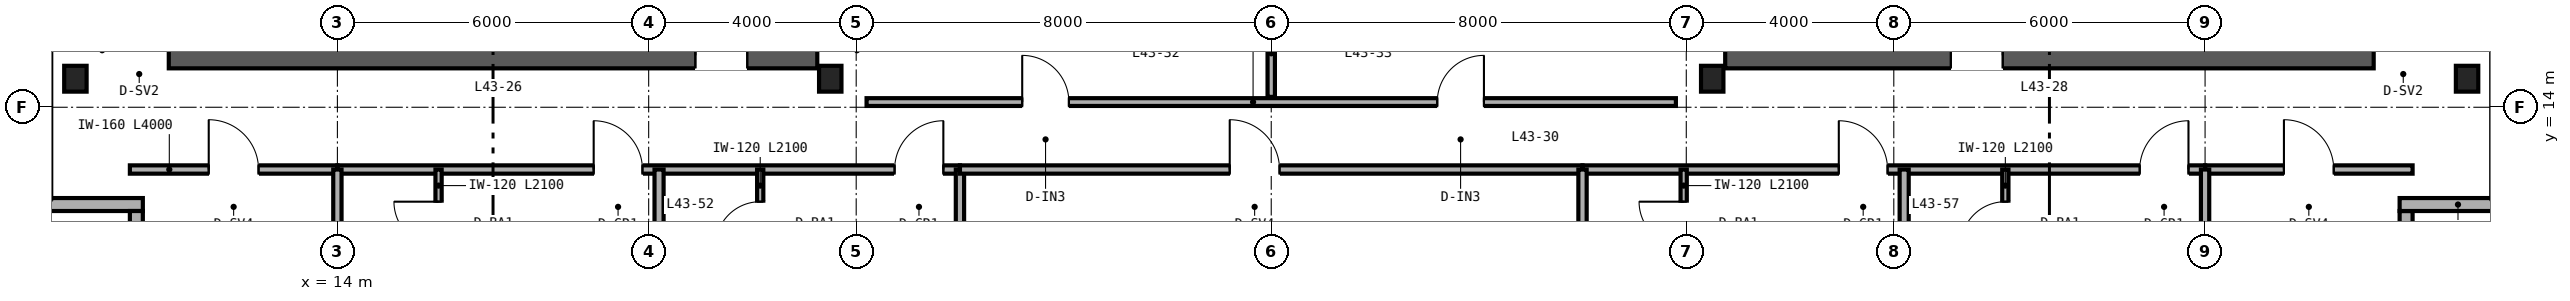
"""IFC4 building model, lengths in metres.
Left out: names, types, materials, properties, quantities, classifications, styles, units other than length and angle.
Written with IfcOpenShell. Run it as: python <this file> out.ifc"""

import sys

from ifc_helpers import new_model, si_unit, direction, frame, frame_2d, origin, origin_2d, place, context, subcontext, project, spatial, rectangle, i_section, extrude, source, transform, mapped, element, fill, save


model = new_model("IFC4")
c1 = context("Model", 3, precision=1e-05, world=origin(), true_north=direction((0.0, 1.0)))
c2 = subcontext(c1, "Body", "Model", "MODEL_VIEW")
j1 = project(units=[si_unit("LENGTHUNIT", "METRE"), si_unit("PLANEANGLEUNIT", "RADIAN")], contexts=[c1])
p1 = place(None, origin())
s1 = spatial("IfcSite", under=j1, at=p1, CompositionType="ELEMENT")
p2 = place(p1, origin())
s2 = spatial("IfcBuilding", under=s1, at=p2, CompositionType="ELEMENT")
p3 = place(p2, frame((0.0, 0.0, 174.0)))
s3 = spatial("IfcBuildingStorey", under=s2, at=p3, CompositionType="ELEMENT", Elevation=174.0)
p4 = place(p3, frame((10.75, 15.0, 0.0), z_axis=(0.0, 0.0, 1.0), x_axis=(1.0, 0.0, 0.0)))
e1 = element("IfcWall", 1, at=p4, inside=s3, PredefinedType="SHEAR", context=c2, shape_type="SweptSolid", body=[
    extrude(rectangle(XDim=12.5, YDim=0.5, at=frame_2d((6.25, 0.0))), origin(), (0.0, 0.0, 1.0), 3.37),
])
p5 = place(p4, frame((10.15, 0.0, 0.0)))
e2 = element("IfcOpeningElement", 2, at=p5, cuts=e1, PredefinedType="OPENING", context=c2, shape_type="SweptSolid", body=[
    extrude(rectangle(XDim=1.0, YDim=2.15, at=frame_2d((0.5, 1.075))), frame((0.0, 0.26, 0.0), z_axis=(0.0, -1.0, 0.0), x_axis=(1.0, 0.0, 0.0)), (0.0, 0.0, 1.0), 0.52),
])
p6 = place(p3, frame((40.75, 15.0, 0.0), z_axis=(0.0, 0.0, 1.0), x_axis=(1.0, 0.0, 0.0)))
e3 = element("IfcWall", 3, at=p6, inside=s3, PredefinedType="SHEAR", context=c2, shape_type="SweptSolid", body=[
    extrude(rectangle(XDim=12.5, YDim=0.5, at=frame_2d((6.25, 0.0))), origin(), (0.0, 0.0, 1.0), 3.37),
])
p7 = place(p6, frame((4.35, 0.0, 0.0)))
e4 = element("IfcOpeningElement", 4, at=p7, cuts=e3, PredefinedType="OPENING", context=c2, shape_type="SweptSolid", body=[
    extrude(rectangle(XDim=1.0, YDim=2.15, at=frame_2d((0.5, 1.075))), frame((0.0, 0.26, 0.0), z_axis=(0.0, -1.0, 0.0), x_axis=(1.0, 0.0, 0.0)), (0.0, 0.0, 1.0), 0.52),
])
m1 = source(origin(), c2, "Body", "SweptSolid", [
    extrude(i_section(OverallWidth=0.432, OverallDepth=0.498, WebThickness=0.056, FlangeThickness=0.089, FilletRadius=0.025, at=origin_2d()), origin(), (0.0, 0.0, 1.0), 3.37),
])
for number, where, z_axis, x_axis in (
    (5, (8.95, 14.55, 0.0), (0.0, 0.0, 1.0), (1.0, 0.0, 0.0)),
    (6, (23.5, 14.55, 0.0), (0.0, 0.0, 1.0), (1.0, 0.0, 0.0)),
    (7, (40.5, 14.55, 0.0), (0.0, 0.0, 1.0), (1.0, 0.0, 0.0)),
    (8, (55.05, 14.55, 0.0), (0.0, 0.0, 1.0), (1.0, 0.0, 0.0)),
):
    element("IfcColumn", number, at=place(p3, frame(where, z_axis=z_axis, x_axis=x_axis)), inside=s3, PredefinedType="COLUMN", context=c2, shape_type="MappedRepresentation", body=[
        mapped(m1, transform((0.0, 0.0, 0.0), scale=1.0)),
    ])
p8 = place(p3, frame((53.875, 10.0, 0.0), z_axis=(0.0, 0.0, 1.0), x_axis=(0.0, 1.0, 0.0)))
e9 = element("IfcWall", 9, at=p8, inside=s3, PredefinedType="SOLIDWALL", context=c2, shape_type="SweptSolid", body=[
    extrude(rectangle(XDim=2.0, YDim=0.25, at=frame_2d((1.0, 0.0))), origin(), (0.0, 0.0, 1.0), 3.37),
])
for number, where, z_axis, x_axis in (
    (10, (53.75, 12.125, 0.0), (0.0, 0.0, 1.0), (1.0, 0.0, 0.0)),
    (11, (8.0, 12.125, 0.0), (0.0, 0.0, 1.0), (1.0, 0.0, 0.0)),
):
    element("IfcWall", number, at=place(p3, frame(where, z_axis=z_axis, x_axis=x_axis)), inside=s3, PredefinedType="SOLIDWALL", context=c2, shape_type="SweptSolid", body=[
        extrude(rectangle(XDim=2.25, YDim=0.25, at=frame_2d((1.125, 0.0))), origin(), (0.0, 0.0, 1.0), 3.37),
    ])
p9 = place(p3, frame((10.125, 12.0, 0.0), z_axis=(0.0, 0.0, 1.0), x_axis=(0.0, -1.0, 0.0)))
e12 = element("IfcWall", 12, at=p9, inside=s3, PredefinedType="SOLIDWALL", context=c2, shape_type="SweptSolid", body=[
    extrude(rectangle(XDim=2.0, YDim=0.25, at=frame_2d((1.0, 0.0))), origin(), (0.0, 0.0, 1.0), 3.37),
])
p10 = place(p3, frame((24.2, 14.1, 0.0), z_axis=(0.0, 0.0, 1.0), x_axis=(1.0, 0.0, 0.0)))
e13 = element("IfcWall", 13, at=p10, inside=s3, PredefinedType="PARTITIONING", context=c2, shape_type="SweptSolid", body=[
    extrude(rectangle(XDim=15.6, YDim=0.15, at=frame_2d((7.8, 0.0))), origin(), (0.0, 0.0, 1.0), 3.37),
])
p11 = place(p10, frame((3.0, 0.0, 0.0)))
e14 = element("IfcOpeningElement", 14, at=p11, cuts=e13, PredefinedType="OPENING", context=c2, shape_type="SweptSolid", body=[
    extrude(rectangle(XDim=0.9, YDim=2.15, at=frame_2d((0.45, 1.075))), frame((0.0, 0.085, 0.0), z_axis=(0.0, -1.0, 0.0), x_axis=(1.0, 0.0, 0.0)), (0.0, 0.0, 1.0), 0.17),
])
p12 = place(p10, frame((11.0, 0.0, 0.0)))
e15 = element("IfcOpeningElement", 15, at=p12, cuts=e13, PredefinedType="OPENING", context=c2, shape_type="SweptSolid", body=[
    extrude(rectangle(XDim=0.9, YDim=2.15, at=frame_2d((0.45, 1.075))), frame((0.0, 0.085, 0.0), z_axis=(0.0, -1.0, 0.0), x_axis=(1.0, 0.0, 0.0)), (0.0, 0.0, 1.0), 0.17),
])
p13 = place(p3, frame((32.0, 14.2, 0.0), z_axis=(0.0, 0.0, 1.0), x_axis=(0.0, 1.0, 0.0)))
e16 = element("IfcWall", 16, at=p13, inside=s3, PredefinedType="PARTITIONING", context=c2, shape_type="SweptSolid", body=[
    extrude(rectangle(XDim=1.68, YDim=0.142, at=frame_2d((0.84, 0.0))), origin(), (0.0, 0.0, 1.0), 3.37),
])
p14 = place(p3, frame((10.0, 12.8, 0.0), z_axis=(0.0, 0.0, 1.0), x_axis=(1.0, 0.0, 0.0)))
e17 = element("IfcWall", 17, at=p14, inside=s3, PredefinedType="PARTITIONING", context=c2, shape_type="SweptSolid", body=[
    extrude(rectangle(XDim=4.0, YDim=0.16, at=frame_2d((2.0, 0.0))), origin(), (0.0, 0.0, 1.0), 3.37),
])
p15 = place(p14, frame((1.52, 0.0, 0.0)))
e18 = element("IfcOpeningElement", 18, at=p15, cuts=e17, PredefinedType="OPENING", context=c2, shape_type="SweptSolid", body=[
    extrude(rectangle(XDim=0.96, YDim=2.15, at=frame_2d((0.48, 1.075))), frame((0.0, 0.09, 0.0), z_axis=(0.0, -1.0, 0.0), x_axis=(1.0, 0.0, 0.0)), (0.0, 0.0, 1.0), 0.18),
])
p16 = place(p3, frame((50.0, 12.8, 0.0), z_axis=(0.0, 0.0, 1.0), x_axis=(1.0, 0.0, 0.0)))
e19 = element("IfcWall", 19, at=p16, inside=s3, PredefinedType="PARTITIONING", context=c2, shape_type="SweptSolid", body=[
    extrude(rectangle(XDim=4.0, YDim=0.16, at=frame_2d((2.0, 0.0))), origin(), (0.0, 0.0, 1.0), 3.37),
])
p17 = place(p16, frame((1.52, 0.0, 0.0)))
e20 = element("IfcOpeningElement", 20, at=p17, cuts=e19, PredefinedType="OPENING", context=c2, shape_type="SweptSolid", body=[
    extrude(rectangle(XDim=0.96, YDim=2.15, at=frame_2d((0.48, 1.075))), frame((0.0, 0.09, 0.0), z_axis=(0.0, -1.0, 0.0), x_axis=(1.0, 0.0, 0.0)), (0.0, 0.0, 1.0), 0.18),
])
p18 = place(p3, frame((14.0, 12.8, 0.0), z_axis=(0.0, 0.0, 1.0), x_axis=(1.0, 0.0, 0.0)))
e21 = element("IfcWall", 21, at=p18, inside=s3, PredefinedType="PARTITIONING", context=c2, shape_type="SweptSolid", body=[
    extrude(rectangle(XDim=12.0, YDim=0.16, at=frame_2d((6.0, 0.0))), origin(), (0.0, 0.0, 1.0), 2.913),
])
p19 = place(p18, frame((4.94, 0.0, 0.0)))
e22 = element("IfcOpeningElement", 22, at=p19, cuts=e21, PredefinedType="OPENING", context=c2, shape_type="SweptSolid", body=[
    extrude(rectangle(XDim=0.94, YDim=2.15, at=frame_2d((0.47, 1.075))), frame((0.0, 0.09, 0.0), z_axis=(0.0, -1.0, 0.0), x_axis=(1.0, 0.0, 0.0)), (0.0, 0.0, 1.0), 0.18),
])
p20 = place(p18, frame((10.74, 0.0, 0.0)))
e23 = element("IfcOpeningElement", 23, at=p20, cuts=e21, PredefinedType="OPENING", context=c2, shape_type="SweptSolid", body=[
    extrude(rectangle(XDim=0.94, YDim=2.15, at=frame_2d((0.47, 1.075))), frame((0.0, 0.09, 0.0), z_axis=(0.0, -1.0, 0.0), x_axis=(1.0, 0.0, 0.0)), (0.0, 0.0, 1.0), 0.18),
])
p21 = place(p3, frame((14.0, 6.36, 0.0), z_axis=(0.0, 0.0, 1.0), x_axis=(0.0, 1.0, 0.0)))
e24 = element("IfcWall", 24, at=p21, inside=s3, PredefinedType="PARTITIONING", context=c2, shape_type="SweptSolid", body=[
    extrude(rectangle(XDim=6.44, YDim=0.16, at=frame_2d((3.22, 0.0))), origin(), (0.0, 0.0, 1.0), 2.677),
])
p22 = place(p3, frame((26.0, 6.36, 0.0), z_axis=(0.0, 0.0, 1.0), x_axis=(0.0, 1.0, 0.0)))
e25 = element("IfcWall", 25, at=p22, inside=s3, PredefinedType="PARTITIONING", context=c2, shape_type="SweptSolid", body=[
    extrude(rectangle(XDim=6.44, YDim=0.16, at=frame_2d((3.22, 0.0))), origin(), (0.0, 0.0, 1.0), 2.443),
])
p23 = place(p3, frame((20.2, 6.36, 0.0), z_axis=(0.0, 0.0, 1.0), x_axis=(0.0, 1.0, 0.0)))
e26 = element("IfcWall", 26, at=p23, inside=s3, PredefinedType="PARTITIONING", context=c2, shape_type="SweptSolid", body=[
    extrude(rectangle(XDim=6.44, YDim=0.175, at=frame_2d((3.22, 0.0))), origin(), (0.0, 0.0, 1.0), 2.677),
])
p24 = place(p3, frame((15.95, 10.7, 0.0), z_axis=(0.0, 0.0, 1.0), x_axis=(0.0, 1.0, 0.0)))
e27 = element("IfcWall", 27, at=p24, inside=s3, PredefinedType="PARTITIONING", context=c2, shape_type="SweptSolid", body=[
    extrude(rectangle(XDim=2.1, YDim=0.12, at=frame_2d((1.05, 0.0))), origin(), (0.0, 0.0, 1.0), 3.37),
])
p25 = place(p24, frame((0.62, 0.0, 0.0)))
e28 = element("IfcOpeningElement", 28, at=p25, cuts=e27, PredefinedType="OPENING", context=c2, shape_type="SweptSolid", body=[
    extrude(rectangle(XDim=0.86, YDim=2.1, at=frame_2d((0.43, 1.05))), frame((0.0, 0.07, 0.0), z_axis=(0.0, -1.0, 0.0), x_axis=(1.0, 0.0, 0.0)), (0.0, 0.0, 1.0), 0.14),
])
p26 = place(p3, frame((22.15, 10.7, 0.0), z_axis=(0.0, 0.0, 1.0), x_axis=(0.0, 1.0, 0.0)))
e29 = element("IfcWall", 29, at=p26, inside=s3, PredefinedType="PARTITIONING", context=c2, shape_type="SweptSolid", body=[
    extrude(rectangle(XDim=2.1, YDim=0.12, at=frame_2d((1.05, 0.0))), origin(), (0.0, 0.0, 1.0), 3.37),
])
p27 = place(p26, frame((0.62, 0.0, 0.0)))
e30 = element("IfcOpeningElement", 30, at=p27, cuts=e29, PredefinedType="OPENING", context=c2, shape_type="SweptSolid", body=[
    extrude(rectangle(XDim=0.86, YDim=2.1, at=frame_2d((0.43, 1.05))), frame((0.0, 0.07, 0.0), z_axis=(0.0, -1.0, 0.0), x_axis=(1.0, 0.0, 0.0)), (0.0, 0.0, 1.0), 0.14),
])
p28 = place(p3, frame((26.0, 12.8, 0.0), z_axis=(0.0, 0.0, 1.0), x_axis=(1.0, 0.0, 0.0)))
e31 = element("IfcWall", 31, at=p28, inside=s3, PredefinedType="PARTITIONING", context=c2, shape_type="SweptSolid", body=[
    extrude(rectangle(XDim=12.0, YDim=0.16, at=frame_2d((6.0, 0.0))), origin(), (0.0, 0.0, 1.0), 3.37),
])
p29 = place(p28, frame((5.2, 0.0, 0.0)))
e32 = element("IfcOpeningElement", 32, at=p29, cuts=e31, PredefinedType="OPENING", context=c2, shape_type="SweptSolid", body=[
    extrude(rectangle(XDim=0.96, YDim=2.15, at=frame_2d((0.48, 1.075))), frame((0.0, 0.09, 0.0), z_axis=(0.0, -1.0, 0.0), x_axis=(1.0, 0.0, 0.0)), (0.0, 0.0, 1.0), 0.18),
])
p30 = place(p3, frame((38.0, 12.8, 0.0), z_axis=(0.0, 0.0, 1.0), x_axis=(1.0, 0.0, 0.0)))
e33 = element("IfcWall", 33, at=p30, inside=s3, PredefinedType="PARTITIONING", context=c2, shape_type="SweptSolid", body=[
    extrude(rectangle(XDim=12.0, YDim=0.16, at=frame_2d((6.0, 0.0))), origin(), (0.0, 0.0, 1.0), 2.913),
])
p31 = place(p30, frame((4.94, 0.0, 0.0)))
e34 = element("IfcOpeningElement", 34, at=p31, cuts=e33, PredefinedType="OPENING", context=c2, shape_type="SweptSolid", body=[
    extrude(rectangle(XDim=0.94, YDim=2.15, at=frame_2d((0.47, 1.075))), frame((0.0, 0.09, 0.0), z_axis=(0.0, -1.0, 0.0), x_axis=(1.0, 0.0, 0.0)), (0.0, 0.0, 1.0), 0.18),
])
p32 = place(p30, frame((10.74, 0.0, 0.0)))
e35 = element("IfcOpeningElement", 35, at=p32, cuts=e33, PredefinedType="OPENING", context=c2, shape_type="SweptSolid", body=[
    extrude(rectangle(XDim=0.94, YDim=2.15, at=frame_2d((0.47, 1.075))), frame((0.0, 0.09, 0.0), z_axis=(0.0, -1.0, 0.0), x_axis=(1.0, 0.0, 0.0)), (0.0, 0.0, 1.0), 0.18),
])
p33 = place(p3, frame((38.0, 6.36, 0.0), z_axis=(0.0, 0.0, 1.0), x_axis=(0.0, 1.0, 0.0)))
e36 = element("IfcWall", 36, at=p33, inside=s3, PredefinedType="PARTITIONING", context=c2, shape_type="SweptSolid", body=[
    extrude(rectangle(XDim=6.44, YDim=0.16, at=frame_2d((3.22, 0.0))), origin(), (0.0, 0.0, 1.0), 2.443),
])
p34 = place(p3, frame((50.0, 6.36, 0.0), z_axis=(0.0, 0.0, 1.0), x_axis=(0.0, 1.0, 0.0)))
e37 = element("IfcWall", 37, at=p34, inside=s3, PredefinedType="PARTITIONING", context=c2, shape_type="SweptSolid", body=[
    extrude(rectangle(XDim=6.44, YDim=0.16, at=frame_2d((3.22, 0.0))), origin(), (0.0, 0.0, 1.0), 2.677),
])
p35 = place(p3, frame((44.2, 6.36, 0.0), z_axis=(0.0, 0.0, 1.0), x_axis=(0.0, 1.0, 0.0)))
e38 = element("IfcWall", 38, at=p35, inside=s3, PredefinedType="PARTITIONING", context=c2, shape_type="SweptSolid", body=[
    extrude(rectangle(XDim=6.44, YDim=0.175, at=frame_2d((3.22, 0.0))), origin(), (0.0, 0.0, 1.0), 2.677),
])
p36 = place(p3, frame((39.95, 10.7, 0.0), z_axis=(0.0, 0.0, 1.0), x_axis=(0.0, 1.0, 0.0)))
e39 = element("IfcWall", 39, at=p36, inside=s3, PredefinedType="PARTITIONING", context=c2, shape_type="SweptSolid", body=[
    extrude(rectangle(XDim=2.1, YDim=0.12, at=frame_2d((1.05, 0.0))), origin(), (0.0, 0.0, 1.0), 3.37),
])
p37 = place(p36, frame((0.62, 0.0, 0.0)))
e40 = element("IfcOpeningElement", 40, at=p37, cuts=e39, PredefinedType="OPENING", context=c2, shape_type="SweptSolid", body=[
    extrude(rectangle(XDim=0.86, YDim=2.1, at=frame_2d((0.43, 1.05))), frame((0.0, 0.07, 0.0), z_axis=(0.0, -1.0, 0.0), x_axis=(1.0, 0.0, 0.0)), (0.0, 0.0, 1.0), 0.14),
])
p38 = place(p3, frame((46.15, 10.7, 0.0), z_axis=(0.0, 0.0, 1.0), x_axis=(0.0, 1.0, 0.0)))
e41 = element("IfcWall", 41, at=p38, inside=s3, PredefinedType="PARTITIONING", context=c2, shape_type="SweptSolid", body=[
    extrude(rectangle(XDim=2.1, YDim=0.12, at=frame_2d((1.05, 0.0))), origin(), (0.0, 0.0, 1.0), 3.37),
])
p39 = place(p38, frame((0.62, 0.0, 0.0)))
e42 = element("IfcOpeningElement", 42, at=p39, cuts=e41, PredefinedType="OPENING", context=c2, shape_type="SweptSolid", body=[
    extrude(rectangle(XDim=0.86, YDim=2.1, at=frame_2d((0.43, 1.05))), frame((0.0, 0.07, 0.0), z_axis=(0.0, -1.0, 0.0), x_axis=(1.0, 0.0, 0.0)), (0.0, 0.0, 1.0), 0.14),
])
m2 = source(origin(), c2, "Body", "SweptSolid", [
    extrude(rectangle(XDim=1.0, YDim=2.15, at=frame_2d((0.5, 1.075))), frame((0.0, 0.025, 0.0), z_axis=(0.0, -1.0, 0.0), x_axis=(1.0, 0.0, 0.0)), (0.0, 0.0, 1.0), 0.05),
])
p40 = place(p5, origin())
e43 = element("IfcDoor", 43, at=p40, inside=s3, OperationType="SINGLE_SWING_LEFT", PredefinedType="DOOR", context=c2, shape_type="MappedRepresentation", body=[
    mapped(m2, transform((0.0, 0.0, 0.0), scale=1.0)),
])
fill(e2, e43)
p41 = place(p7, origin())
e44 = element("IfcDoor", 44, at=p41, inside=s3, OperationType="SINGLE_SWING_RIGHT", PredefinedType="DOOR", context=c2, shape_type="MappedRepresentation", body=[
    mapped(m2, transform((0.0, 0.0, 0.0), scale=1.0)),
])
fill(e4, e44)
m3 = source(origin(), c2, "Body", "SweptSolid", [
    extrude(rectangle(XDim=0.9, YDim=2.15, at=frame_2d((0.45, 1.075))), frame((0.0, 0.025, 0.0), z_axis=(0.0, -1.0, 0.0), x_axis=(1.0, 0.0, 0.0)), (0.0, 0.0, 1.0), 0.05),
])
p42 = place(p11, origin())
e45 = element("IfcDoor", 45, at=p42, inside=s3, OperationType="SINGLE_SWING_LEFT", PredefinedType="DOOR", context=c2, shape_type="MappedRepresentation", body=[
    mapped(m3, transform((0.0, 0.0, 0.0), scale=1.0)),
])
fill(e14, e45)
p43 = place(p12, origin())
e46 = element("IfcDoor", 46, at=p43, inside=s3, OperationType="SINGLE_SWING_RIGHT", PredefinedType="DOOR", context=c2, shape_type="MappedRepresentation", body=[
    mapped(m3, transform((0.0, 0.0, 0.0), scale=1.0)),
])
fill(e15, e46)
m4 = source(origin(), c2, "Body", "SweptSolid", [
    extrude(rectangle(XDim=0.96, YDim=2.15, at=frame_2d((0.48, 1.075))), frame((0.0, 0.025, 0.0), z_axis=(0.0, -1.0, 0.0), x_axis=(1.0, 0.0, 0.0)), (0.0, 0.0, 1.0), 0.05),
])
p44 = place(p15, origin())
e47 = element("IfcDoor", 47, at=p44, inside=s3, OperationType="SINGLE_SWING_LEFT", PredefinedType="DOOR", context=c2, shape_type="MappedRepresentation", body=[
    mapped(m4, transform((0.0, 0.0, 0.0), scale=1.0)),
])
fill(e18, e47)
p45 = place(p17, origin())
e48 = element("IfcDoor", 48, at=p45, inside=s3, OperationType="SINGLE_SWING_LEFT", PredefinedType="DOOR", context=c2, shape_type="MappedRepresentation", body=[
    mapped(m4, transform((0.0, 0.0, 0.0), scale=1.0)),
])
fill(e20, e48)
m5 = source(origin(), c2, "Body", "SweptSolid", [
    extrude(rectangle(XDim=0.86, YDim=2.1, at=frame_2d((0.43, 1.05))), frame((0.0, 0.025, 0.0), z_axis=(0.0, -1.0, 0.0), x_axis=(1.0, 0.0, 0.0)), (0.0, 0.0, 1.0), 0.05),
])
p46 = place(p25, origin())
e49 = element("IfcDoor", 49, at=p46, inside=s3, OperationType="SINGLE_SWING_RIGHT", PredefinedType="DOOR", context=c2, shape_type="MappedRepresentation", body=[
    mapped(m5, transform((0.0, 0.0, 0.0), scale=1.0)),
])
fill(e28, e49)
p47 = place(p27, origin())
e50 = element("IfcDoor", 50, at=p47, inside=s3, OperationType="SINGLE_SWING_LEFT", PredefinedType="DOOR", context=c2, shape_type="MappedRepresentation", body=[
    mapped(m5, transform((0.0, 0.0, 0.0), scale=1.0)),
])
fill(e30, e50)
m6 = source(origin(), c2, "Body", "SweptSolid", [
    extrude(rectangle(XDim=0.94, YDim=2.15, at=frame_2d((0.47, 1.075))), frame((0.0, 0.025, 0.0), z_axis=(0.0, -1.0, 0.0), x_axis=(1.0, 0.0, 0.0)), (0.0, 0.0, 1.0), 0.05),
])
p48 = place(p19, origin())
e51 = element("IfcDoor", 51, at=p48, inside=s3, OperationType="SINGLE_SWING_LEFT", PredefinedType="DOOR", context=c2, shape_type="MappedRepresentation", body=[
    mapped(m6, transform((0.0, 0.0, 0.0), scale=1.0)),
])
fill(e22, e51)
p49 = place(p20, origin())
e52 = element("IfcDoor", 52, at=p49, inside=s3, OperationType="SINGLE_SWING_RIGHT", PredefinedType="DOOR", context=c2, shape_type="MappedRepresentation", body=[
    mapped(m6, transform((0.0, 0.0, 0.0), scale=1.0)),
])
fill(e23, e52)
p50 = place(p29, origin())
e53 = element("IfcDoor", 53, at=p50, inside=s3, OperationType="SINGLE_SWING_LEFT", PredefinedType="DOOR", context=c2, shape_type="MappedRepresentation", body=[
    mapped(m4, transform((0.0, 0.0, 0.0), scale=1.0)),
])
fill(e32, e53)
p51 = place(p37, origin())
e54 = element("IfcDoor", 54, at=p51, inside=s3, OperationType="SINGLE_SWING_RIGHT", PredefinedType="DOOR", context=c2, shape_type="MappedRepresentation", body=[
    mapped(m5, transform((0.0, 0.0, 0.0), scale=1.0)),
])
fill(e40, e54)
p52 = place(p39, origin())
e55 = element("IfcDoor", 55, at=p52, inside=s3, OperationType="SINGLE_SWING_LEFT", PredefinedType="DOOR", context=c2, shape_type="MappedRepresentation", body=[
    mapped(m5, transform((0.0, 0.0, 0.0), scale=1.0)),
])
fill(e42, e55)
p53 = place(p31, origin())
e56 = element("IfcDoor", 56, at=p53, inside=s3, OperationType="SINGLE_SWING_LEFT", PredefinedType="DOOR", context=c2, shape_type="MappedRepresentation", body=[
    mapped(m6, transform((0.0, 0.0, 0.0), scale=1.0)),
])
fill(e34, e56)
p54 = place(p32, origin())
e57 = element("IfcDoor", 57, at=p54, inside=s3, OperationType="SINGLE_SWING_RIGHT", PredefinedType="DOOR", context=c2, shape_type="MappedRepresentation", body=[
    mapped(m6, transform((0.0, 0.0, 0.0), scale=1.0)),
])
fill(e35, e57)
save(model, sys.argv[1])
